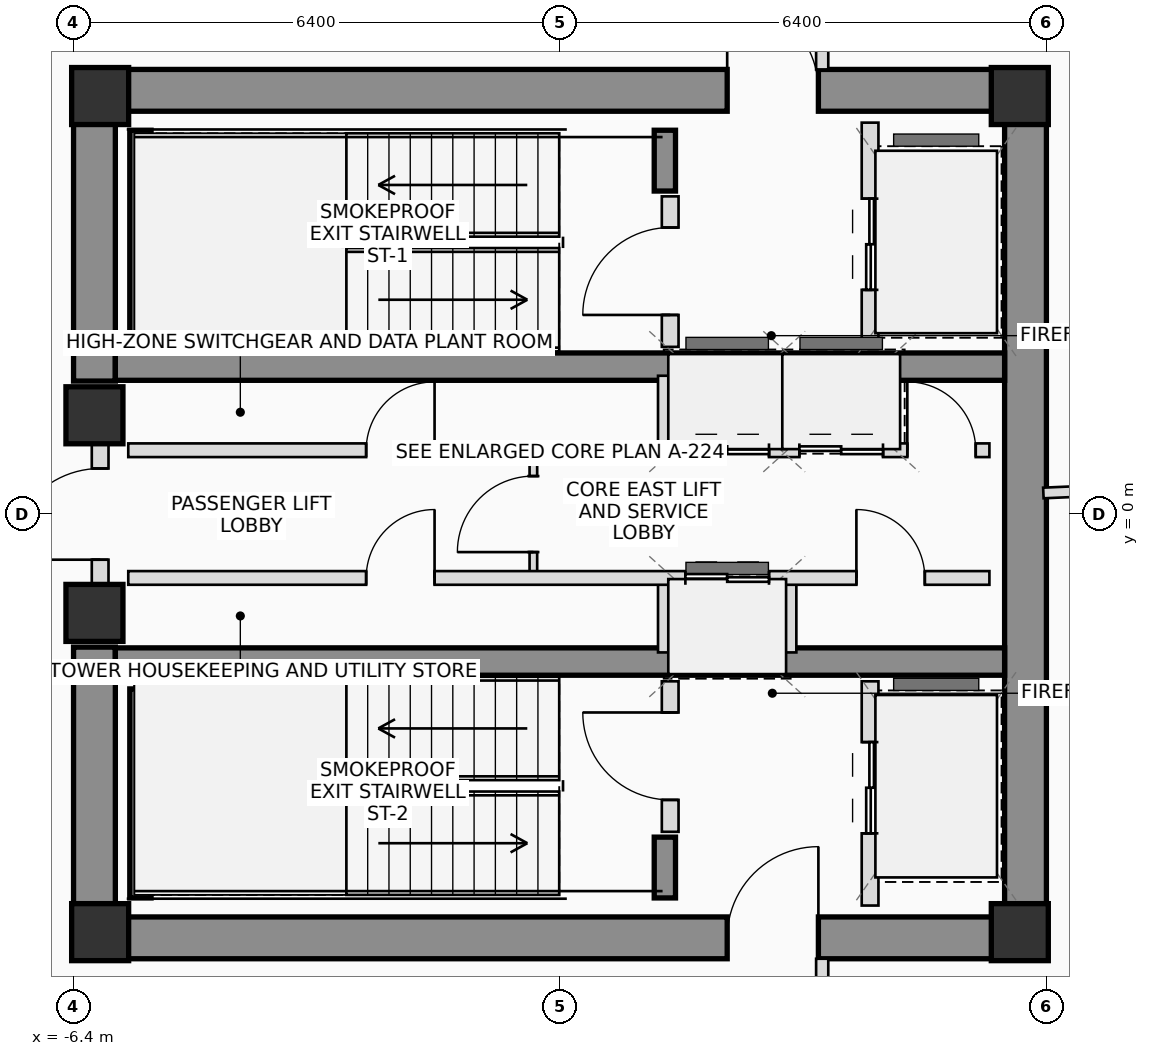
"""IFC4 building model, lengths in metres.
Left out: names, types, materials, properties, quantities, classifications, styles, units other than length and angle.
Written with IfcOpenShell. Run it as: python <this file> out.ifc"""

import sys

from ifc_helpers import new_model, si_unit, direction, frame, frame_2d, origin, origin_2d, place, context, subcontext, project, spatial, rectangle, extrude, source, transform, mapped, element, fill, save


model = new_model("IFC4")
c1 = context("Model", 3, precision=1e-05, world=origin(), true_north=direction((0.0, 1.0)))
c2 = subcontext(c1, "Body", "Model", "MODEL_VIEW")
j1 = project(units=[si_unit("LENGTHUNIT", "METRE"), si_unit("PLANEANGLEUNIT", "RADIAN")], contexts=[c1])
p1 = place(None, origin())
s1 = spatial("IfcSite", under=j1, at=p1, CompositionType="ELEMENT")
p2 = place(p1, origin())
s2 = spatial("IfcBuilding", under=s1, at=p2, CompositionType="ELEMENT")
p3 = place(p2, frame((0.0, 0.0, 257.55)))
s3 = spatial("IfcBuildingStorey", under=s2, at=p3, CompositionType="ELEMENT", Elevation=257.55)
m1 = source(origin(), c2, "Body", "SweptSolid", [
    extrude(rectangle(XDim=0.75, YDim=0.75, at=origin_2d()), origin(), (0.0, 0.0, 1.0), 3.4),
])
for number, where, z_axis, x_axis in (
    (1, (-6.05, -5.5, 0.0), (0.0, 0.0, 1.0), (1.0, 0.0, 0.0)),
    (2, (6.05, -5.5, 0.0), (0.0, 0.0, 1.0), (1.0, 0.0, 0.0)),
    (3, (6.05, 5.5, 0.0), (0.0, 0.0, 1.0), (1.0, 0.0, 0.0)),
    (4, (-6.05, 5.5, 0.0), (0.0, 0.0, 1.0), (1.0, 0.0, 0.0)),
):
    element("IfcColumn", number, at=place(p3, frame(where, z_axis=z_axis, x_axis=x_axis)), inside=s3, PredefinedType="COLUMN", context=c2, shape_type="MappedRepresentation", body=[
        mapped(m1, transform((0.0, 0.0, 0.0), scale=1.0)),
    ])
p4 = place(p3, frame((-6.4, 5.575, 0.0), z_axis=(0.0, 0.0, 1.0), x_axis=(1.0, 0.0, 0.0)))
e5 = element("IfcWall", 5, at=p4, inside=s3, PredefinedType="SHEAR", context=c2, shape_type="SweptSolid", body=[
    extrude(rectangle(XDim=12.8, YDim=0.55, at=frame_2d((6.4, 0.0))), origin(), (0.0, 0.0, 1.0), 3.4),
])
p5 = place(p4, frame((8.6, 0.0, 0.0)))
e6 = element("IfcOpeningElement", 6, at=p5, cuts=e5, PredefinedType="OPENING", context=c2, shape_type="SweptSolid", body=[
    extrude(rectangle(XDim=1.2, YDim=2.2, at=frame_2d((0.6, 1.1))), frame((0.0, 0.285, 0.0), z_axis=(0.0, -1.0, 0.0), x_axis=(1.0, 0.0, 0.0)), (0.0, 0.0, 1.0), 0.57),
])
p6 = place(p3, frame((-6.4, -5.575, 0.0), z_axis=(0.0, 0.0, 1.0), x_axis=(1.0, 0.0, 0.0)))
e7 = element("IfcWall", 7, at=p6, inside=s3, PredefinedType="SHEAR", context=c2, shape_type="SweptSolid", body=[
    extrude(rectangle(XDim=12.8, YDim=0.55, at=frame_2d((6.4, 0.0))), origin(), (0.0, 0.0, 1.0), 3.4),
])
p7 = place(p6, frame((8.6, 0.0, 0.0)))
e8 = element("IfcOpeningElement", 8, at=p7, cuts=e7, PredefinedType="OPENING", context=c2, shape_type="SweptSolid", body=[
    extrude(rectangle(XDim=1.2, YDim=2.2, at=frame_2d((0.6, 1.1))), frame((0.0, 0.285, 0.0), z_axis=(0.0, -1.0, 0.0), x_axis=(1.0, 0.0, 0.0)), (0.0, 0.0, 1.0), 0.57),
])
p8 = place(p3, frame((6.125, -5.3, 0.0), z_axis=(0.0, 0.0, 1.0), x_axis=(0.0, 1.0, 0.0)))
e9 = element("IfcWall", 9, at=p8, inside=s3, PredefinedType="SHEAR", context=c2, shape_type="SweptSolid", body=[
    extrude(rectangle(XDim=10.6, YDim=0.55, at=frame_2d((5.3, 0.0))), origin(), (0.0, 0.0, 1.0), 3.4),
])
for number, where, z_axis, x_axis in (
    (10, (-6.125, -5.3, 0.0), (0.0, 0.0, 1.0), (0.0, 1.0, 0.0)),
    (11, (-6.125, 1.75, 0.0), (0.0, 0.0, 1.0), (0.0, 1.0, 0.0)),
):
    element("IfcWall", number, at=place(p3, frame(where, z_axis=z_axis, x_axis=x_axis)), inside=s3, PredefinedType="SHEAR", context=c2, shape_type="SweptSolid", body=[
        extrude(rectangle(XDim=3.55, YDim=0.55, at=frame_2d((1.775, 0.0))), origin(), (0.0, 0.0, 1.0), 3.4),
    ])
for number, where, z_axis, x_axis in (
    (12, (-5.85, 1.94, 0.0), (0.0, 0.0, 1.0), (1.0, 0.0, 0.0)),
    (13, (-5.85, -1.94, 0.0), (0.0, 0.0, 1.0), (1.0, 0.0, 0.0)),
):
    element("IfcWall", number, at=place(p3, frame(where, z_axis=z_axis, x_axis=x_axis)), inside=s3, PredefinedType="SHEAR", context=c2, shape_type="SweptSolid", body=[
        extrude(rectangle(XDim=11.7, YDim=0.36, at=frame_2d((5.85, 0.0))), origin(), (0.0, 0.0, 1.0), 3.4),
    ])
p9 = place(p3, frame((-5.52, 2.3, 0.0), z_axis=(0.0, 0.0, 1.0), x_axis=(0.0, 1.0, 0.0)))
e14 = element("IfcWall", 14, at=p9, inside=s3, PredefinedType="SHEAR", context=c2, shape_type="SweptSolid", body=[
    extrude(rectangle(XDim=2.75, YDim=0.28, at=frame_2d((1.375, 0.0))), origin(), (0.0, 0.0, 1.0), 3.4),
])
p10 = place(p3, frame((1.38, 4.25, 0.0), z_axis=(0.0, 0.0, 1.0), x_axis=(0.0, 1.0, 0.0)))
e15 = element("IfcWall", 15, at=p10, inside=s3, PredefinedType="SHEAR", context=c2, shape_type="SweptSolid", body=[
    extrude(rectangle(XDim=0.8, YDim=0.28, at=frame_2d((0.4, 0.0))), origin(), (0.0, 0.0, 1.0), 3.4),
])
p11 = place(p3, frame((-5.52, -5.05, 0.0), z_axis=(0.0, 0.0, 1.0), x_axis=(0.0, 1.0, 0.0)))
e16 = element("IfcWall", 16, at=p11, inside=s3, PredefinedType="SHEAR", context=c2, shape_type="SweptSolid", body=[
    extrude(rectangle(XDim=2.75, YDim=0.28, at=frame_2d((1.375, 0.0))), origin(), (0.0, 0.0, 1.0), 3.4),
])
p12 = place(p3, frame((1.38, -5.05, 0.0), z_axis=(0.0, 0.0, 1.0), x_axis=(0.0, 1.0, 0.0)))
e17 = element("IfcWall", 17, at=p12, inside=s3, PredefinedType="SHEAR", context=c2, shape_type="SweptSolid", body=[
    extrude(rectangle(XDim=0.8, YDim=0.28, at=frame_2d((0.4, 0.0))), origin(), (0.0, 0.0, 1.0), 3.4),
])
for number, where, z_axis, x_axis in (
    (18, (-6.125, -1.3, 0.0), (0.0, 0.0, 1.0), (1.0, 0.0, 0.0)),
    (19, (-6.125, 1.3, 0.0), (0.0, 0.0, 1.0), (1.0, 0.0, 0.0)),
):
    element("IfcColumn", number, at=place(p3, frame(where, z_axis=z_axis, x_axis=x_axis)), inside=s3, PredefinedType="COLUMN", context=c2, shape_type="MappedRepresentation", body=[
        mapped(m1, transform((0.0, 0.0, 0.0), scale=1.0)),
    ])
p13 = place(p3, frame((-6.05, -0.95, 0.0), z_axis=(0.0, 0.0, 1.0), x_axis=(0.0, 1.0, 0.0)))
e20 = element("IfcWall", 20, at=p13, inside=s3, PredefinedType="PLUMBINGWALL", context=c2, shape_type="SweptSolid", body=[
    extrude(rectangle(XDim=1.9, YDim=0.22, at=frame_2d((0.95, 0.0))), origin(), (0.0, 0.0, 1.0), 2.18),
])
p14 = place(p13, frame((0.35, 0.0, 0.0)))
e21 = element("IfcOpeningElement", 21, at=p14, cuts=e20, PredefinedType="OPENING", context=c2, shape_type="SweptSolid", body=[
    extrude(rectangle(XDim=1.2, YDim=2.2, at=frame_2d((0.6, 1.1))), frame((0.0, 0.12, 0.0), z_axis=(0.0, -1.0, 0.0), x_axis=(1.0, 0.0, 0.0)), (0.0, 0.0, 1.0), 0.24),
])
p15 = place(p3, frame((1.45, 2.2, 0.0), z_axis=(0.0, 0.0, 1.0), x_axis=(0.0, 1.0, 0.0)))
e22 = element("IfcWall", 22, at=p15, inside=s3, PredefinedType="PLUMBINGWALL", context=c2, shape_type="SweptSolid", body=[
    extrude(rectangle(XDim=1.98, YDim=0.22, at=frame_2d((0.99, 0.0))), origin(), (0.0, 0.0, 1.0), 3.2),
])
p16 = place(p15, frame((0.42, 0.0, 0.0)))
e23 = element("IfcOpeningElement", 23, at=p16, cuts=e22, PredefinedType="OPENING", context=c2, shape_type="SweptSolid", body=[
    extrude(rectangle(XDim=1.15, YDim=2.15, at=frame_2d((0.575, 1.075))), frame((0.0, 0.12, 0.0), z_axis=(0.0, -1.0, 0.0), x_axis=(1.0, 0.0, 0.0)), (0.0, 0.0, 1.0), 0.24),
])
p17 = place(p3, frame((4.08, 2.2, 0.0), z_axis=(0.0, 0.0, 1.0), x_axis=(0.0, 1.0, 0.0)))
e24 = element("IfcWall", 24, at=p17, inside=s3, PredefinedType="PLUMBINGWALL", context=c2, shape_type="SweptSolid", body=[
    extrude(rectangle(XDim=2.95, YDim=0.22, at=frame_2d((1.475, 0.0))), origin(), (0.0, 0.0, 1.0), 3.2),
])
p18 = place(p17, frame((0.75, 0.0, 0.0)))
e25 = element("IfcOpeningElement", 25, at=p18, cuts=e24, PredefinedType="OPENING", context=c2, shape_type="SweptSolid", body=[
    extrude(rectangle(XDim=1.2, YDim=2.25, at=frame_2d((0.6, 1.125))), frame((0.0, 0.12, 0.0), z_axis=(0.0, -1.0, 0.0), x_axis=(1.0, 0.0, 0.0)), (0.0, 0.0, 1.0), 0.24),
])
p19 = place(p3, frame((1.45, -4.18, 0.0), z_axis=(0.0, 0.0, 1.0), x_axis=(0.0, 1.0, 0.0)))
e26 = element("IfcWall", 26, at=p19, inside=s3, PredefinedType="PLUMBINGWALL", context=c2, shape_type="SweptSolid", body=[
    extrude(rectangle(XDim=1.98, YDim=0.22, at=frame_2d((0.99, 0.0))), origin(), (0.0, 0.0, 1.0), 3.2),
])
p20 = place(p19, frame((0.42, 0.0, 0.0)))
e27 = element("IfcOpeningElement", 27, at=p20, cuts=e26, PredefinedType="OPENING", context=c2, shape_type="SweptSolid", body=[
    extrude(rectangle(XDim=1.15, YDim=2.15, at=frame_2d((0.575, 1.075))), frame((0.0, 0.12, 0.0), z_axis=(0.0, -1.0, 0.0), x_axis=(1.0, 0.0, 0.0)), (0.0, 0.0, 1.0), 0.24),
])
p21 = place(p3, frame((4.08, -5.15, 0.0), z_axis=(0.0, 0.0, 1.0), x_axis=(0.0, 1.0, 0.0)))
e28 = element("IfcWall", 28, at=p21, inside=s3, PredefinedType="PLUMBINGWALL", context=c2, shape_type="SweptSolid", body=[
    extrude(rectangle(XDim=2.95, YDim=0.22, at=frame_2d((1.475, 0.0))), origin(), (0.0, 0.0, 1.0), 3.2),
])
p22 = place(p21, frame((0.95, 0.0, 0.0)))
e29 = element("IfcOpeningElement", 29, at=p22, cuts=e28, PredefinedType="OPENING", context=c2, shape_type="SweptSolid", body=[
    extrude(rectangle(XDim=1.2, YDim=2.25, at=frame_2d((0.6, 1.125))), frame((0.0, 0.12, 0.0), z_axis=(0.0, -1.0, 0.0), x_axis=(1.0, 0.0, 0.0)), (0.0, 0.0, 1.0), 0.24),
])
p23 = place(p3, frame((-0.35, -0.84, 0.0), z_axis=(0.0, 0.0, 1.0), x_axis=(0.0, 1.0, 0.0)))
e30 = element("IfcWall", 30, at=p23, inside=s3, PredefinedType="PARTITIONING", context=c2, shape_type="SweptSolid", body=[
    extrude(rectangle(XDim=1.68, YDim=0.1, at=frame_2d((0.84, 0.0))), origin(), (0.0, 0.0, 1.0), 3.2),
])
p24 = place(p23, frame((0.34, 0.0, 0.0)))
e31 = element("IfcOpeningElement", 31, at=p24, cuts=e30, PredefinedType="OPENING", context=c2, shape_type="SweptSolid", body=[
    extrude(rectangle(XDim=1.0, YDim=2.25, at=frame_2d((0.5, 1.125))), frame((0.0, 0.06, 0.0), z_axis=(0.0, -1.0, 0.0), x_axis=(1.0, 0.0, 0.0)), (0.0, 0.0, 1.0), 0.12),
])
for number, where, z_axis, x_axis in (
    (32, (1.38, 0.84, 0.0), (0.0, 0.0, 1.0), (0.0, 1.0, 0.0)),
    (33, (1.38, -1.82, 0.0), (0.0, 0.0, 1.0), (0.0, 1.0, 0.0)),
    (34, (3.02, 0.84, 0.0), (0.0, 0.0, 1.0), (0.0, 1.0, 0.0)),
    (35, (4.38, 0.84, 0.0), (0.0, 0.0, 1.0), (0.0, 1.0, 0.0)),
    (36, (3.02, -1.82, 0.0), (0.0, 0.0, 1.0), (0.0, 1.0, 0.0)),
):
    element("IfcWall", number, at=place(p3, frame(where, z_axis=z_axis, x_axis=x_axis)), inside=s3, PredefinedType="PLUMBINGWALL", context=c2, shape_type="SweptSolid", body=[
        extrude(rectangle(XDim=0.98, YDim=0.18, at=frame_2d((0.49, 0.0))), origin(), (0.0, 0.0, 1.0), 3.2),
    ])
p25 = place(p3, frame((-5.68, 0.84, 0.0), z_axis=(0.0, 0.0, 1.0), x_axis=(1.0, 0.0, 0.0)))
e37 = element("IfcWall", 37, at=p25, inside=s3, PredefinedType="PLUMBINGWALL", context=c2, shape_type="SweptSolid", body=[
    extrude(rectangle(XDim=11.33, YDim=0.18, at=frame_2d((5.665, 0.0))), origin(), (0.0, 0.0, 1.0), 3.2),
])
p26 = place(p25, frame((3.13, 0.0, 0.0)))
e38 = element("IfcOpeningElement", 38, at=p26, cuts=e37, PredefinedType="OPENING", context=c2, shape_type="SweptSolid", body=[
    extrude(rectangle(XDim=0.9, YDim=2.05, at=frame_2d((0.45, 1.025))), frame((0.0, 0.1, 0.0), z_axis=(0.0, -1.0, 0.0), x_axis=(1.0, 0.0, 0.0)), (0.0, 0.0, 1.0), 0.2),
])
p27 = place(p25, frame((7.33, 0.0, 0.0)))
e39 = element("IfcOpeningElement", 39, at=p27, cuts=e37, PredefinedType="OPENING", context=c2, shape_type="SweptSolid", body=[
    extrude(rectangle(XDim=1.1, YDim=2.2, at=frame_2d((0.55, 1.1))), frame((0.0, 0.1, 0.0), z_axis=(0.0, -1.0, 0.0), x_axis=(1.0, 0.0, 0.0)), (0.0, 0.0, 1.0), 0.2),
])
p28 = place(p25, frame((8.83, 0.0, 0.0)))
e40 = element("IfcOpeningElement", 40, at=p28, cuts=e37, PredefinedType="OPENING", context=c2, shape_type="SweptSolid", body=[
    extrude(rectangle(XDim=1.1, YDim=2.2, at=frame_2d((0.55, 1.1))), frame((0.0, 0.1, 0.0), z_axis=(0.0, -1.0, 0.0), x_axis=(1.0, 0.0, 0.0)), (0.0, 0.0, 1.0), 0.2),
])
p29 = place(p25, frame((10.25, 0.0, 0.0)))
e41 = element("IfcOpeningElement", 41, at=p29, cuts=e37, PredefinedType="OPENING", context=c2, shape_type="SweptSolid", body=[
    extrude(rectangle(XDim=0.9, YDim=2.05, at=frame_2d((0.45, 1.025))), frame((0.0, 0.1, 0.0), z_axis=(0.0, -1.0, 0.0), x_axis=(1.0, 0.0, 0.0)), (0.0, 0.0, 1.0), 0.2),
])
p30 = place(p3, frame((-5.68, -0.84, 0.0), z_axis=(0.0, 0.0, 1.0), x_axis=(1.0, 0.0, 0.0)))
e42 = element("IfcWall", 42, at=p30, inside=s3, PredefinedType="PLUMBINGWALL", context=c2, shape_type="SweptSolid", body=[
    extrude(rectangle(XDim=11.33, YDim=0.18, at=frame_2d((5.665, 0.0))), origin(), (0.0, 0.0, 1.0), 3.2),
])
p31 = place(p30, frame((3.13, 0.0, 0.0)))
e43 = element("IfcOpeningElement", 43, at=p31, cuts=e42, PredefinedType="OPENING", context=c2, shape_type="SweptSolid", body=[
    extrude(rectangle(XDim=0.9, YDim=2.05, at=frame_2d((0.45, 1.025))), frame((0.0, 0.1, 0.0), z_axis=(0.0, -1.0, 0.0), x_axis=(1.0, 0.0, 0.0)), (0.0, 0.0, 1.0), 0.2),
])
p32 = place(p30, frame((7.33, 0.0, 0.0)))
e44 = element("IfcOpeningElement", 44, at=p32, cuts=e42, PredefinedType="OPENING", context=c2, shape_type="SweptSolid", body=[
    extrude(rectangle(XDim=1.1, YDim=2.2, at=frame_2d((0.55, 1.1))), frame((0.0, 0.1, 0.0), z_axis=(0.0, -1.0, 0.0), x_axis=(1.0, 0.0, 0.0)), (0.0, 0.0, 1.0), 0.2),
])
p33 = place(p30, frame((9.58, 0.0, 0.0)))
e45 = element("IfcOpeningElement", 45, at=p33, cuts=e42, PredefinedType="OPENING", context=c2, shape_type="SweptSolid", body=[
    extrude(rectangle(XDim=0.9, YDim=2.05, at=frame_2d((0.45, 1.025))), frame((0.0, 0.1, 0.0), z_axis=(0.0, -1.0, 0.0), x_axis=(1.0, 0.0, 0.0)), (0.0, 0.0, 1.0), 0.2),
])
p34 = place(p3, frame((3.45, 7.49, 0.0), z_axis=(0.0, 0.0, 1.0), x_axis=(0.0, -1.0, 0.0)))
e46 = element("IfcWall", 46, at=p34, inside=s3, PredefinedType="PARTITIONING", context=c2, shape_type="SweptSolid", body=[
    extrude(rectangle(XDim=1.64, YDim=0.16, at=frame_2d((0.82, 0.0))), origin(), (0.0, 0.0, 1.0), 2.805),
])
p35 = place(p3, frame((3.45, -5.85, 0.0), z_axis=(0.0, 0.0, 1.0), x_axis=(0.0, -1.0, 0.0)))
e47 = element("IfcWall", 47, at=p35, inside=s3, PredefinedType="PARTITIONING", context=c2, shape_type="SweptSolid", body=[
    extrude(rectangle(XDim=1.64, YDim=0.16, at=frame_2d((0.82, 0.0))), origin(), (0.0, 0.0, 1.0), 3.2),
])
p36 = place(p35, frame((0.32, 0.0, 0.0)))
e48 = element("IfcOpeningElement", 48, at=p36, cuts=e47, PredefinedType="OPENING", context=c2, shape_type="SweptSolid", body=[
    extrude(rectangle(XDim=1.0, YDim=2.25, at=frame_2d((0.5, 1.125))), frame((0.0, 0.09, 0.0), z_axis=(0.0, -1.0, 0.0), x_axis=(1.0, 0.0, 0.0)), (0.0, 0.0, 1.0), 0.18),
])
p37 = place(p3, frame((6.36, 0.278, 0.0), z_axis=(0.0, 0.0, 1.0), x_axis=(0.999047617824, 0.043633213494, 0.0)))
e49 = element("IfcWall", 49, at=p37, inside=s3, PredefinedType="PARTITIONING", context=c2, shape_type="SweptSolid", body=[
    extrude(rectangle(XDim=13.406, YDim=0.14, at=frame_2d((6.703, 0.0))), origin(), (0.0, 0.0, 1.0), 2.605),
])
p38 = place(p5, origin())
e50 = element("IfcDoor", 50, at=p38, inside=s3, OperationType="SINGLE_SWING_LEFT", PredefinedType="DOOR", context=c2, shape_type="SweptSolid", body=[
    extrude(rectangle(XDim=1.2, YDim=2.2, at=frame_2d((0.6, 1.1))), frame((0.0, 0.025, 0.0), z_axis=(0.0, -1.0, 0.0), x_axis=(1.0, 0.0, 0.0)), (0.0, 0.0, 1.0), 0.05),
])
fill(e6, e50)
p39 = place(p7, origin())
e51 = element("IfcDoor", 51, at=p39, inside=s3, OperationType="SINGLE_SWING_RIGHT", PredefinedType="DOOR", context=c2, shape_type="SweptSolid", body=[
    extrude(rectangle(XDim=1.2, YDim=2.2, at=frame_2d((0.6, 1.1))), frame((0.0, 0.025, 0.0), z_axis=(0.0, -1.0, 0.0), x_axis=(1.0, 0.0, 0.0)), (0.0, 0.0, 1.0), 0.05),
])
fill(e8, e51)
p40 = place(p14, origin())
e52 = element("IfcDoor", 52, at=p40, inside=s3, OperationType="SINGLE_SWING_LEFT", PredefinedType="DOOR", context=c2, shape_type="SweptSolid", body=[
    extrude(rectangle(XDim=1.2, YDim=2.2, at=frame_2d((0.6, 1.1))), frame((0.0, 0.025, 0.0), z_axis=(0.0, -1.0, 0.0), x_axis=(1.0, 0.0, 0.0)), (0.0, 0.0, 1.0), 0.05),
])
fill(e21, e52)
p41 = place(p16, origin())
e53 = element("IfcDoor", 53, at=p41, inside=s3, OperationType="SINGLE_SWING_LEFT", PredefinedType="DOOR", context=c2, shape_type="SweptSolid", body=[
    extrude(rectangle(XDim=1.15, YDim=2.15, at=frame_2d((0.575, 1.075))), frame((0.0, 0.025, 0.0), z_axis=(0.0, -1.0, 0.0), x_axis=(1.0, 0.0, 0.0)), (0.0, 0.0, 1.0), 0.05),
])
fill(e23, e53)
p42 = place(p18, origin())
e54 = element("IfcDoor", 54, at=p42, inside=s3, OperationType="DOUBLE_DOOR_SLIDING", PredefinedType="DOOR", context=c2, shape_type="SweptSolid", body=[
    extrude(rectangle(XDim=1.2, YDim=2.25, at=frame_2d((0.6, 1.125))), frame((0.0, 0.025, 0.0), z_axis=(0.0, -1.0, 0.0), x_axis=(1.0, 0.0, 0.0)), (0.0, 0.0, 1.0), 0.05),
])
fill(e25, e54)
p43 = place(p20, origin())
e55 = element("IfcDoor", 55, at=p43, inside=s3, OperationType="SINGLE_SWING_RIGHT", PredefinedType="DOOR", context=c2, shape_type="SweptSolid", body=[
    extrude(rectangle(XDim=1.15, YDim=2.15, at=frame_2d((0.575, 1.075))), frame((0.0, 0.025, 0.0), z_axis=(0.0, -1.0, 0.0), x_axis=(1.0, 0.0, 0.0)), (0.0, 0.0, 1.0), 0.05),
])
fill(e27, e55)
p44 = place(p22, origin())
e56 = element("IfcDoor", 56, at=p44, inside=s3, OperationType="DOUBLE_DOOR_SLIDING", PredefinedType="DOOR", context=c2, shape_type="SweptSolid", body=[
    extrude(rectangle(XDim=1.2, YDim=2.25, at=frame_2d((0.6, 1.125))), frame((0.0, 0.025, 0.0), z_axis=(0.0, -1.0, 0.0), x_axis=(1.0, 0.0, 0.0)), (0.0, 0.0, 1.0), 0.05),
])
fill(e29, e56)
p45 = place(p24, origin())
e57 = element("IfcDoor", 57, at=p45, inside=s3, OperationType="SINGLE_SWING_LEFT", PredefinedType="DOOR", context=c2, shape_type="SweptSolid", body=[
    extrude(rectangle(XDim=1.0, YDim=2.25, at=frame_2d((0.5, 1.125))), frame((0.0, 0.025, 0.0), z_axis=(0.0, -1.0, 0.0), x_axis=(1.0, 0.0, 0.0)), (0.0, 0.0, 1.0), 0.05),
])
fill(e31, e57)
p46 = place(p26, origin())
e58 = element("IfcDoor", 58, at=p46, inside=s3, OperationType="SINGLE_SWING_RIGHT", PredefinedType="DOOR", context=c2, shape_type="SweptSolid", body=[
    extrude(rectangle(XDim=0.9, YDim=2.05, at=frame_2d((0.45, 1.025))), frame((0.0, 0.025, 0.0), z_axis=(0.0, -1.0, 0.0), x_axis=(1.0, 0.0, 0.0)), (0.0, 0.0, 1.0), 0.05),
])
fill(e38, e58)
p47 = place(p27, origin())
e59 = element("IfcDoor", 59, at=p47, inside=s3, OperationType="DOUBLE_DOOR_SLIDING", PredefinedType="DOOR", context=c2, shape_type="SweptSolid", body=[
    extrude(rectangle(XDim=1.1, YDim=2.2, at=frame_2d((0.55, 1.1))), frame((0.0, 0.025, 0.0), z_axis=(0.0, -1.0, 0.0), x_axis=(1.0, 0.0, 0.0)), (0.0, 0.0, 1.0), 0.05),
])
fill(e39, e59)
p48 = place(p28, origin())
e60 = element("IfcDoor", 60, at=p48, inside=s3, OperationType="DOUBLE_DOOR_SLIDING", PredefinedType="DOOR", context=c2, shape_type="SweptSolid", body=[
    extrude(rectangle(XDim=1.1, YDim=2.2, at=frame_2d((0.55, 1.1))), frame((0.0, 0.025, 0.0), z_axis=(0.0, -1.0, 0.0), x_axis=(1.0, 0.0, 0.0)), (0.0, 0.0, 1.0), 0.05),
])
fill(e40, e60)
p49 = place(p29, origin())
e61 = element("IfcDoor", 61, at=p49, inside=s3, OperationType="SINGLE_SWING_LEFT", PredefinedType="DOOR", context=c2, shape_type="SweptSolid", body=[
    extrude(rectangle(XDim=0.9, YDim=2.05, at=frame_2d((0.45, 1.025))), frame((0.0, 0.025, 0.0), z_axis=(0.0, -1.0, 0.0), x_axis=(1.0, 0.0, 0.0)), (0.0, 0.0, 1.0), 0.05),
])
fill(e41, e61)
p50 = place(p31, origin())
e62 = element("IfcDoor", 62, at=p50, inside=s3, OperationType="SINGLE_SWING_RIGHT", PredefinedType="DOOR", context=c2, shape_type="SweptSolid", body=[
    extrude(rectangle(XDim=0.9, YDim=2.05, at=frame_2d((0.45, 1.025))), frame((0.0, 0.025, 0.0), z_axis=(0.0, -1.0, 0.0), x_axis=(1.0, 0.0, 0.0)), (0.0, 0.0, 1.0), 0.05),
])
fill(e43, e62)
p51 = place(p32, origin())
e63 = element("IfcDoor", 63, at=p51, inside=s3, OperationType="DOUBLE_DOOR_SLIDING", PredefinedType="DOOR", context=c2, shape_type="SweptSolid", body=[
    extrude(rectangle(XDim=1.1, YDim=2.2, at=frame_2d((0.55, 1.1))), frame((0.0, 0.025, 0.0), z_axis=(0.0, -1.0, 0.0), x_axis=(1.0, 0.0, 0.0)), (0.0, 0.0, 1.0), 0.05),
])
fill(e44, e63)
p52 = place(p33, origin())
e64 = element("IfcDoor", 64, at=p52, inside=s3, OperationType="SINGLE_SWING_LEFT", PredefinedType="DOOR", context=c2, shape_type="SweptSolid", body=[
    extrude(rectangle(XDim=0.9, YDim=2.05, at=frame_2d((0.45, 1.025))), frame((0.0, 0.025, 0.0), z_axis=(0.0, -1.0, 0.0), x_axis=(1.0, 0.0, 0.0)), (0.0, 0.0, 1.0), 0.05),
])
fill(e45, e64)
save(model, sys.argv[1])
